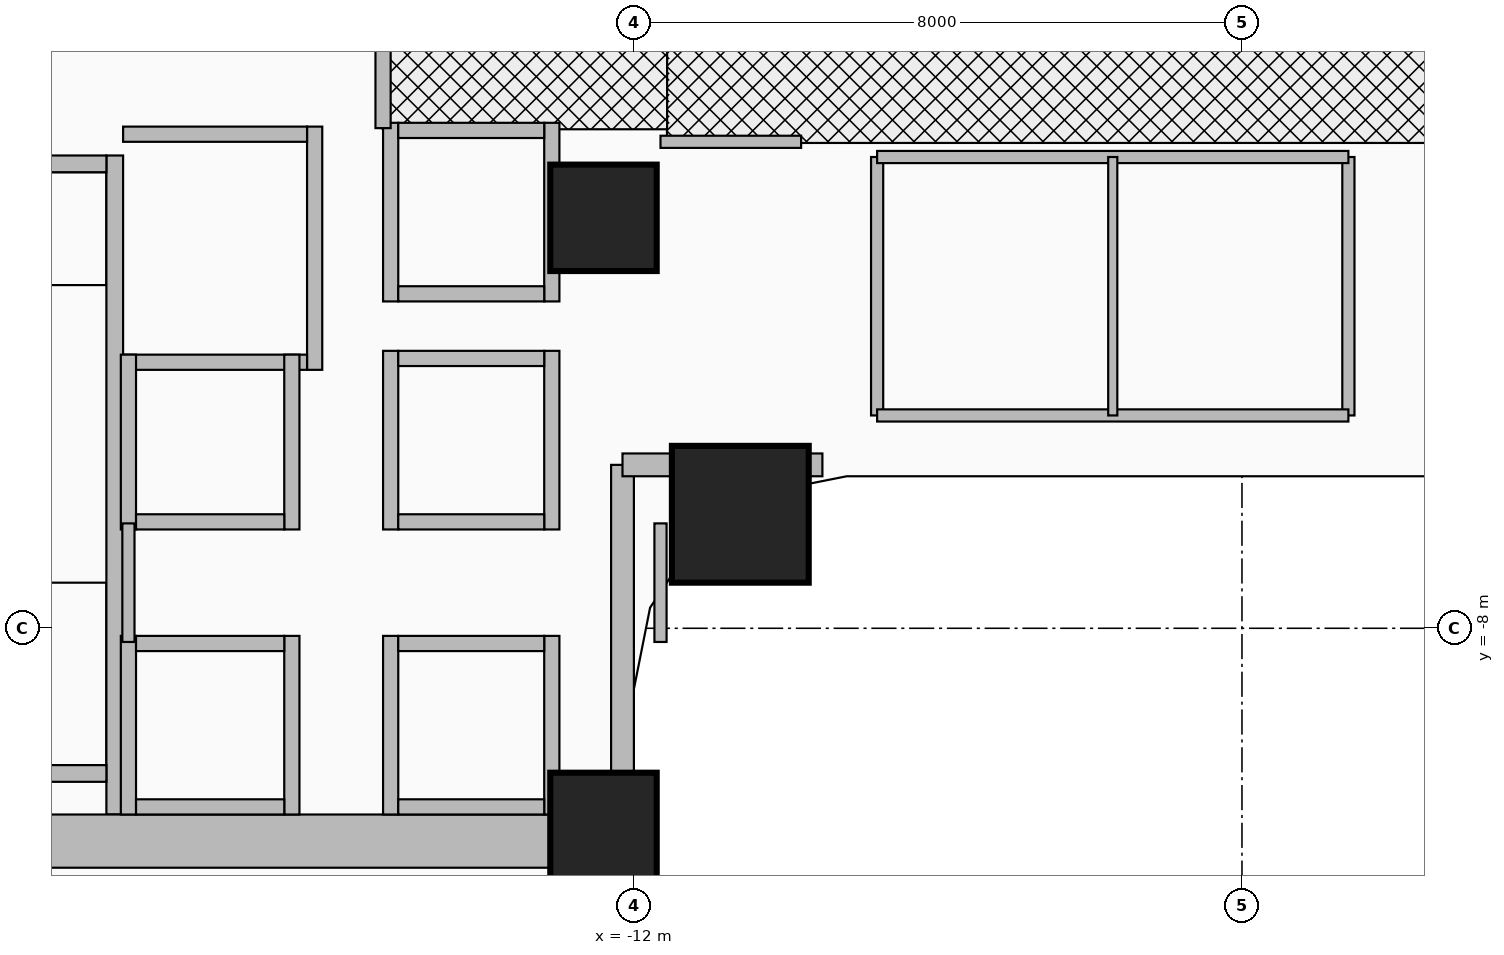
"""IFC4 building model, lengths in metres.
Left out: names, types, materials, properties, quantities, classifications, styles, units other than length and angle.
Written with IfcOpenShell. Run it as: python <this file> out.ifc"""

import sys

from ifc_helpers import new_model, si_unit, direction, frame, frame_2d, origin, origin_2d, place, context, subcontext, project, spatial, rectangle, extrude, source, transform, mapped, element, fill, save


model = new_model("IFC4")
c1 = context("Model", 3, precision=1e-05, world=origin(), true_north=direction((0.0, 1.0)))
c2 = subcontext(c1, "Body", "Model", "MODEL_VIEW")
j1 = project(units=[si_unit("LENGTHUNIT", "METRE"), si_unit("PLANEANGLEUNIT", "RADIAN")], contexts=[c1])
p1 = place(None, origin())
s1 = spatial("IfcSite", under=j1, at=p1, CompositionType="ELEMENT")
p2 = place(p1, origin())
s2 = spatial("IfcBuilding", under=s1, at=p2, CompositionType="ELEMENT")
p3 = place(p2, frame((0.0, 0.0, 15.6)))
s3 = spatial("IfcBuildingStorey", under=s2, at=p3, CompositionType="ELEMENT", Elevation=15.6)
p4 = place(p3, frame((-18.83, -10.45, 0.0), z_axis=(0.0, 0.0, 1.0), x_axis=(0.0, 1.0, 0.0)))
e1 = element("IfcWall", 1, at=p4, inside=s3, PredefinedType="SHEAR", context=c2, shape_type="SweptSolid", body=[
    extrude(rectangle(XDim=8.67, YDim=0.22, at=frame_2d((4.335, 0.0))), origin(), (0.0, 0.0, 1.0), 4.8),
])
p5 = place(p3, frame((-22.05, -9.91, 0.0), z_axis=(0.0, 0.0, 1.0), x_axis=(1.0, 0.0, 0.0)))
e2 = element("IfcWall", 2, at=p5, inside=s3, PredefinedType="SHEAR", context=c2, shape_type="SweptSolid", body=[
    extrude(rectangle(XDim=3.11, YDim=0.22, at=frame_2d((1.555, 0.0))), origin(), (0.0, 0.0, 1.0), 4.8),
])
p6 = place(p3, frame((-22.05, -1.89, 0.0), z_axis=(0.0, 0.0, 1.0), x_axis=(1.0, 0.0, 0.0)))
e3 = element("IfcWall", 3, at=p6, inside=s3, PredefinedType="SHEAR", context=c2, shape_type="SweptSolid", body=[
    extrude(rectangle(XDim=3.11, YDim=0.22, at=frame_2d((1.555, 0.0))), origin(), (0.0, 0.0, 1.0), 4.8),
])
p7 = place(p6, frame((1.0, 0.0, 0.0)))
e4 = element("IfcOpeningElement", 4, at=p7, cuts=e3, PredefinedType="OPENING", context=c2, shape_type="SweptSolid", body=[
    extrude(rectangle(XDim=1.1, YDim=2.15, at=frame_2d((0.55, 1.075))), frame((0.0, 0.125, 0.0), z_axis=(0.0, -1.0, 0.0), x_axis=(1.0, 0.0, 0.0)), (0.0, 0.0, 1.0), 0.25),
])
p8 = place(p3, frame((-22.65, -10.8, 0.0), z_axis=(0.0, 0.0, 1.0), x_axis=(1.0, 0.0, 0.0)))
e5 = element("IfcWall", 5, at=p8, inside=s3, PredefinedType="SHEAR", context=c2, shape_type="SweptSolid", body=[
    extrude(rectangle(XDim=10.25, YDim=0.7, at=frame_2d((5.125, 0.0))), origin(), (0.0, 0.0, 1.0), 4.8),
])
m1 = source(origin(), c2, "Body", "SweptSolid", [
    extrude(rectangle(XDim=1.4, YDim=1.4, at=origin_2d()), origin(), (0.0, 0.0, 1.0), 5.2),
])
for number, where, z_axis, x_axis in (
    (6, (-12.4, -10.6, 0.0), (0.0, 0.0, 1.0), (1.0, 0.0, 0.0)),
    (7, (-12.4, -2.6, 0.0), (0.0, 0.0, 1.0), (1.0, 0.0, 0.0)),
):
    element("IfcColumn", number, at=place(p3, frame(where, z_axis=z_axis, x_axis=x_axis)), inside=s3, PredefinedType="COLUMN", context=c2, shape_type="MappedRepresentation", body=[
        mapped(m1, transform((0.0, 0.0, 0.0), x_axis=(1.0, 0.0, 0.0), y_axis=(0.0, 1.0, 0.0), z_axis=(0.0, 0.0, 1.0), scale=1.0)),
    ])
m2 = source(origin(), c2, "Body", "SweptSolid", [
    extrude(rectangle(XDim=1.8, YDim=1.8, at=origin_2d()), origin(), (0.0, 0.0, 1.0), 5.2),
])
p9 = place(p3, frame((-10.6, -6.5, 0.0), z_axis=(0.0, 0.0, 1.0), x_axis=(1.0, 0.0, 0.0)))
e8 = element("IfcColumn", 8, at=p9, inside=s3, PredefinedType="COLUMN", context=c2, shape_type="MappedRepresentation", body=[
    mapped(m2, transform((0.0, 0.0, 0.0), x_axis=(1.0, 0.0, 0.0), y_axis=(0.0, 1.0, 0.0), z_axis=(0.0, 0.0, 1.0), scale=1.0)),
])
p10 = place(p3, frame((-12.15, -22.85, 0.0), z_axis=(0.0, 0.0, 1.0), x_axis=(0.0, 1.0, 0.0)))
e9 = element("IfcWall", 9, at=p10, inside=s3, PredefinedType="SOLIDWALL", context=c2, shape_type="SweptSolid", body=[
    extrude(rectangle(XDim=17.0, YDim=0.3, at=frame_2d((8.5, 0.0))), origin(), (0.0, 0.0, 1.0), 3.585),
])
p11 = place(p3, frame((-12.15, -5.85, 0.0), z_axis=(0.0, 0.0, 1.0), x_axis=(1.0, 0.0, 0.0)))
e10 = element("IfcWall", 10, at=p11, inside=s3, PredefinedType="SOLIDWALL", context=c2, shape_type="SweptSolid", body=[
    extrude(rectangle(XDim=2.63, YDim=0.3, at=frame_2d((1.315, 0.0))), origin(), (0.0, 0.0, 1.0), 4.8),
])
p12 = place(p3, frame((-16.2, -4.6, 0.0), z_axis=(0.0, 0.0, 1.0), x_axis=(0.0, 1.0, 0.0)))
e11 = element("IfcWall", 11, at=p12, inside=s3, PredefinedType="MOVABLE", context=c2, shape_type="SweptSolid", body=[
    extrude(rectangle(XDim=3.2, YDim=0.2, at=frame_2d((1.6, 0.0))), origin(), (0.0, 0.0, 1.0), 4.8),
])
p13 = place(p3, frame((-18.72, -4.5, 0.0), z_axis=(0.0, 0.0, 1.0), x_axis=(1.0, 0.0, 0.0)))
e12 = element("IfcWall", 12, at=p13, inside=s3, PredefinedType="MOVABLE", context=c2, shape_type="SweptSolid", body=[
    extrude(rectangle(XDim=2.42, YDim=0.2, at=frame_2d((1.21, 0.0))), origin(), (0.0, 0.0, 1.0), 4.8),
])
p14 = place(p3, frame((-18.72, -1.5, 0.0), z_axis=(0.0, 0.0, 1.0), x_axis=(1.0, 0.0, 0.0)))
e13 = element("IfcWall", 13, at=p14, inside=s3, PredefinedType="MOVABLE", context=c2, shape_type="SweptSolid", body=[
    extrude(rectangle(XDim=2.42, YDim=0.2, at=frame_2d((1.21, 0.0))), origin(), (0.0, 0.0, 1.0), 4.8),
])
p15 = place(p14, frame((0.61, 0.0, 0.0)))
e14 = element("IfcOpeningElement", 14, at=p15, cuts=e13, PredefinedType="OPENING", context=c2, shape_type="SweptSolid", body=[
    extrude(rectangle(XDim=1.2, YDim=2.1, at=frame_2d((0.6, 1.05))), frame((0.0, 0.115, 0.0), z_axis=(0.0, -1.0, 0.0), x_axis=(1.0, 0.0, 0.0)), (0.0, 0.0, 1.0), 0.23),
])
for number, where, z_axis, x_axis in (
    (15, (-15.2, -10.45, 0.0), (0.0, 0.0, 1.0), (0.0, 1.0, 0.0)),
    (16, (-13.08, -10.45, 0.0), (0.0, 0.0, 1.0), (0.0, 1.0, 0.0)),
):
    element("IfcWall", number, at=place(p3, frame(where, z_axis=z_axis, x_axis=x_axis)), inside=s3, PredefinedType="MOVABLE", context=c2, shape_type="SweptSolid", body=[
        extrude(rectangle(XDim=2.35, YDim=0.2, at=frame_2d((1.175, 0.0))), origin(), (0.0, 0.0, 1.0), 3.585),
    ])
p16 = place(p3, frame((-15.1, -10.35, 0.0), z_axis=(0.0, 0.0, 1.0), x_axis=(1.0, 0.0, 0.0)))
e17 = element("IfcWall", 17, at=p16, inside=s3, PredefinedType="MOVABLE", context=c2, shape_type="SweptSolid", body=[
    extrude(rectangle(XDim=1.92, YDim=0.2, at=frame_2d((0.96, 0.0))), origin(), (0.0, 0.0, 1.0), 3.585),
])
p17 = place(p3, frame((-15.1, -8.2, 0.0), z_axis=(0.0, 0.0, 1.0), x_axis=(1.0, 0.0, 0.0)))
e18 = element("IfcWall", 18, at=p17, inside=s3, PredefinedType="MOVABLE", context=c2, shape_type="SweptSolid", body=[
    extrude(rectangle(XDim=1.92, YDim=0.2, at=frame_2d((0.96, 0.0))), origin(), (0.0, 0.0, 1.0), 4.8),
])
p18 = place(p17, frame((0.41, 0.0, 0.0)))
e19 = element("IfcOpeningElement", 19, at=p18, cuts=e18, PredefinedType="OPENING", context=c2, shape_type="SweptSolid", body=[
    extrude(rectangle(XDim=1.1, YDim=2.1, at=frame_2d((0.55, 1.05))), frame((0.0, 0.115, 0.0), z_axis=(0.0, -1.0, 0.0), x_axis=(1.0, 0.0, 0.0)), (0.0, 0.0, 1.0), 0.23),
])
for number, where, z_axis, x_axis in (
    (20, (-15.2, -6.7, 0.0), (0.0, 0.0, 1.0), (0.0, 1.0, 0.0)),
    (21, (-13.08, -6.7, 0.0), (0.0, 0.0, 1.0), (0.0, 1.0, 0.0)),
):
    element("IfcWall", number, at=place(p3, frame(where, z_axis=z_axis, x_axis=x_axis)), inside=s3, PredefinedType="MOVABLE", context=c2, shape_type="SweptSolid", body=[
        extrude(rectangle(XDim=2.35, YDim=0.2, at=frame_2d((1.175, 0.0))), origin(), (0.0, 0.0, 1.0), 4.8),
    ])
p19 = place(p3, frame((-15.1, -6.6, 0.0), z_axis=(0.0, 0.0, 1.0), x_axis=(1.0, 0.0, 0.0)))
e22 = element("IfcWall", 22, at=p19, inside=s3, PredefinedType="MOVABLE", context=c2, shape_type="SweptSolid", body=[
    extrude(rectangle(XDim=1.92, YDim=0.2, at=frame_2d((0.96, 0.0))), origin(), (0.0, 0.0, 1.0), 4.8),
])
p20 = place(p19, frame((0.41, 0.0, 0.0)))
e23 = element("IfcOpeningElement", 23, at=p20, cuts=e22, PredefinedType="OPENING", context=c2, shape_type="SweptSolid", body=[
    extrude(rectangle(XDim=1.1, YDim=2.1, at=frame_2d((0.55, 1.05))), frame((0.0, 0.115, 0.0), z_axis=(0.0, -1.0, 0.0), x_axis=(1.0, 0.0, 0.0)), (0.0, 0.0, 1.0), 0.23),
])
p21 = place(p3, frame((-15.1, -4.45, 0.0), z_axis=(0.0, 0.0, 1.0), x_axis=(1.0, 0.0, 0.0)))
e24 = element("IfcWall", 24, at=p21, inside=s3, PredefinedType="MOVABLE", context=c2, shape_type="SweptSolid", body=[
    extrude(rectangle(XDim=1.92, YDim=0.2, at=frame_2d((0.96, 0.0))), origin(), (0.0, 0.0, 1.0), 4.8),
])
for number, where, z_axis, x_axis in (
    (25, (-18.65, -10.45, 0.0), (0.0, 0.0, 1.0), (0.0, 1.0, 0.0)),
    (26, (-16.5, -10.45, 0.0), (0.0, 0.0, 1.0), (0.0, 1.0, 0.0)),
):
    element("IfcWall", number, at=place(p3, frame(where, z_axis=z_axis, x_axis=x_axis)), inside=s3, PredefinedType="MOVABLE", context=c2, shape_type="SweptSolid", body=[
        extrude(rectangle(XDim=2.35, YDim=0.2, at=frame_2d((1.175, 0.0))), origin(), (0.0, 0.0, 1.0), 3.585),
    ])
p22 = place(p3, frame((-18.55, -10.35, 0.0), z_axis=(0.0, 0.0, 1.0), x_axis=(1.0, 0.0, 0.0)))
e27 = element("IfcWall", 27, at=p22, inside=s3, PredefinedType="MOVABLE", context=c2, shape_type="SweptSolid", body=[
    extrude(rectangle(XDim=1.95, YDim=0.2, at=frame_2d((0.975, 0.0))), origin(), (0.0, 0.0, 1.0), 3.585),
])
p23 = place(p3, frame((-18.55, -8.2, 0.0), z_axis=(0.0, 0.0, 1.0), x_axis=(1.0, 0.0, 0.0)))
e28 = element("IfcWall", 28, at=p23, inside=s3, PredefinedType="MOVABLE", context=c2, shape_type="SweptSolid", body=[
    extrude(rectangle(XDim=1.95, YDim=0.2, at=frame_2d((0.975, 0.0))), origin(), (0.0, 0.0, 1.0), 4.8),
])
for number, where, z_axis, x_axis in (
    (29, (-18.65, -6.7, 0.0), (0.0, 0.0, 1.0), (0.0, 1.0, 0.0)),
    (30, (-16.5, -6.7, 0.0), (0.0, 0.0, 1.0), (0.0, 1.0, 0.0)),
):
    element("IfcWall", number, at=place(p3, frame(where, z_axis=z_axis, x_axis=x_axis)), inside=s3, PredefinedType="MOVABLE", context=c2, shape_type="SweptSolid", body=[
        extrude(rectangle(XDim=2.3, YDim=0.2, at=frame_2d((1.15, 0.0))), origin(), (0.0, 0.0, 1.0), 4.8),
    ])
p24 = place(p3, frame((-18.55, -6.6, 0.0), z_axis=(0.0, 0.0, 1.0), x_axis=(1.0, 0.0, 0.0)))
e31 = element("IfcWall", 31, at=p24, inside=s3, PredefinedType="MOVABLE", context=c2, shape_type="SweptSolid", body=[
    extrude(rectangle(XDim=1.95, YDim=0.2, at=frame_2d((0.975, 0.0))), origin(), (0.0, 0.0, 1.0), 4.8),
])
for number, where, z_axis, x_axis in (
    (32, (-15.2, -3.7, 0.0), (0.0, 0.0, 1.0), (0.0, 1.0, 0.0)),
    (33, (-13.08, -3.7, 0.0), (0.0, 0.0, 1.0), (0.0, 1.0, 0.0)),
):
    element("IfcWall", number, at=place(p3, frame(where, z_axis=z_axis, x_axis=x_axis)), inside=s3, PredefinedType="MOVABLE", context=c2, shape_type="SweptSolid", body=[
        extrude(rectangle(XDim=2.35, YDim=0.2, at=frame_2d((1.175, 0.0))), origin(), (0.0, 0.0, 1.0), 4.8),
    ])
for number, where, z_axis, x_axis in (
    (34, (-15.1, -3.6, 0.0), (0.0, 0.0, 1.0), (1.0, 0.0, 0.0)),
    (35, (-15.1, -1.45, 0.0), (0.0, 0.0, 1.0), (1.0, 0.0, 0.0)),
):
    element("IfcWall", number, at=place(p3, frame(where, z_axis=z_axis, x_axis=x_axis)), inside=s3, PredefinedType="MOVABLE", context=c2, shape_type="SweptSolid", body=[
        extrude(rectangle(XDim=1.92, YDim=0.2, at=frame_2d((0.96, 0.0))), origin(), (0.0, 0.0, 1.0), 4.8),
    ])
p25 = place(p3, frame((-15.3, -1.42, 0.0), z_axis=(0.0, 0.0, 1.0), x_axis=(0.0, 1.0, 0.0)))
e36 = element("IfcWall", 36, at=p25, inside=s3, PredefinedType="PARTITIONING", context=c2, shape_type="SweptSolid", body=[
    extrude(rectangle(XDim=2.67, YDim=0.2, at=frame_2d((1.335, 0.0))), origin(), (0.0, 0.0, 1.0), 4.8),
])
p26 = place(p25, frame((0.78, 0.0, 0.0)))
e37 = element("IfcOpeningElement", 37, at=p26, cuts=e36, PredefinedType="OPENING", context=c2, shape_type="SweptSolid", body=[
    extrude(rectangle(XDim=1.05, YDim=2.15, at=frame_2d((0.525, 1.075))), frame((0.0, 0.115, 0.0), z_axis=(0.0, -1.0, 0.0), x_axis=(1.0, 0.0, 0.0)), (0.0, 0.0, 1.0), 0.23),
])
p27 = place(p3, frame((-18.65, -8.18, 0.0), z_axis=(0.0, 0.0, 1.0), x_axis=(0.0, 1.0, 0.0)))
e38 = element("IfcWall", 38, at=p27, inside=s3, PredefinedType="PARTITIONING", context=c2, shape_type="SweptSolid", body=[
    extrude(rectangle(XDim=1.56, YDim=0.16, at=frame_2d((0.78, 0.0))), origin(), (0.0, 0.0, 1.0), 4.8),
])
p28 = place(p3, frame((-11.65, -8.18, 0.0), z_axis=(0.0, 0.0, 1.0), x_axis=(0.0, 1.0, 0.0)))
e39 = element("IfcWall", 39, at=p28, inside=s3, PredefinedType="PARTITIONING", context=c2, shape_type="SweptSolid", body=[
    extrude(rectangle(XDim=1.56, YDim=0.16, at=frame_2d((0.78, 0.0))), origin(), (0.0, 0.0, 1.0), 3.837),
])
for number, where, z_axis, x_axis in (
    (40, (-8.8, -5.2, 0.0), (0.0, 0.0, 1.0), (0.0, 1.0, 0.0)),
    (41, (-2.6, -5.2, 0.0), (0.0, 0.0, 1.0), (0.0, 1.0, 0.0)),
):
    element("IfcWall", number, at=place(p3, frame(where, z_axis=z_axis, x_axis=x_axis)), inside=s3, PredefinedType="PARTITIONING", context=c2, shape_type="SweptSolid", body=[
        extrude(rectangle(XDim=3.4, YDim=0.16, at=frame_2d((1.7, 0.0))), origin(), (0.0, 0.0, 1.0), 4.8),
    ])
p29 = place(p3, frame((-8.8, -5.2, 0.0), z_axis=(0.0, 0.0, 1.0), x_axis=(1.0, 0.0, 0.0)))
e42 = element("IfcWall", 42, at=p29, inside=s3, PredefinedType="PARTITIONING", context=c2, shape_type="SweptSolid", body=[
    extrude(rectangle(XDim=6.2, YDim=0.16, at=frame_2d((3.1, 0.0))), origin(), (0.0, 0.0, 1.0), 4.8),
])
p30 = place(p3, frame((-8.8, -1.8, 0.0), z_axis=(0.0, 0.0, 1.0), x_axis=(1.0, 0.0, 0.0)))
e43 = element("IfcWall", 43, at=p30, inside=s3, PredefinedType="PARTITIONING", context=c2, shape_type="SweptSolid", body=[
    extrude(rectangle(XDim=6.2, YDim=0.16, at=frame_2d((3.1, 0.0))), origin(), (0.0, 0.0, 1.0), 4.8),
])
p31 = place(p30, frame((0.3, 0.0, 0.0)))
e44 = element("IfcOpeningElement", 44, at=p31, cuts=e43, PredefinedType="OPENING", context=c2, shape_type="SweptSolid", body=[
    extrude(rectangle(XDim=0.85, YDim=2.1, at=frame_2d((0.425, 1.05))), frame((0.0, 0.095, 0.0), z_axis=(0.0, -1.0, 0.0), x_axis=(1.0, 0.0, 0.0)), (0.0, 0.0, 1.0), 0.19),
])
p32 = place(p30, frame((3.35, 0.0, 0.0)))
e45 = element("IfcOpeningElement", 45, at=p32, cuts=e43, PredefinedType="OPENING", context=c2, shape_type="SweptSolid", body=[
    extrude(rectangle(XDim=0.85, YDim=2.1, at=frame_2d((0.425, 1.05))), frame((0.0, 0.095, 0.0), z_axis=(0.0, -1.0, 0.0), x_axis=(1.0, 0.0, 0.0)), (0.0, 0.0, 1.0), 0.19),
])
p33 = place(p3, frame((-5.7, -5.2, 0.0), z_axis=(0.0, 0.0, 1.0), x_axis=(0.0, 1.0, 0.0)))
e46 = element("IfcWall", 46, at=p33, inside=s3, PredefinedType="PARTITIONING", context=c2, shape_type="SweptSolid", body=[
    extrude(rectangle(XDim=3.4, YDim=0.12, at=frame_2d((1.7, 0.0))), origin(), (0.0, 0.0, 1.0), 4.8),
])
p34 = place(p3, frame((-11.65, -1.6, 0.0), z_axis=(0.0, 0.0, 1.0), x_axis=(1.0, 0.0, 0.0)))
e47 = element("IfcWall", 47, at=p34, inside=s3, PredefinedType="PARTITIONING", context=c2, shape_type="SweptSolid", body=[
    extrude(rectangle(XDim=1.85, YDim=0.16, at=frame_2d((0.925, 0.0))), origin(), (0.0, 0.0, 1.0), 4.8),
])
p35 = place(p15, origin())
e48 = element("IfcDoor", 48, at=p35, inside=s3, OperationType="DOUBLE_DOOR_SLIDING", PredefinedType="DOOR", context=c2, shape_type="SweptSolid", body=[
    extrude(rectangle(XDim=1.2, YDim=2.1, at=frame_2d((0.6, 1.05))), frame((0.0, 0.025, 0.0), z_axis=(0.0, -1.0, 0.0), x_axis=(1.0, 0.0, 0.0)), (0.0, 0.0, 1.0), 0.05),
])
fill(e14, e48)
p36 = place(p18, origin())
e49 = element("IfcDoor", 49, at=p36, inside=s3, OperationType="DOUBLE_DOOR_SLIDING", PredefinedType="DOOR", context=c2, shape_type="SweptSolid", body=[
    extrude(rectangle(XDim=1.1, YDim=2.1, at=frame_2d((0.55, 1.05))), frame((0.0, 0.025, 0.0), z_axis=(0.0, -1.0, 0.0), x_axis=(1.0, 0.0, 0.0)), (0.0, 0.0, 1.0), 0.05),
])
fill(e19, e49)
p37 = place(p20, origin())
e50 = element("IfcDoor", 50, at=p37, inside=s3, OperationType="DOUBLE_DOOR_SLIDING", PredefinedType="DOOR", context=c2, shape_type="SweptSolid", body=[
    extrude(rectangle(XDim=1.1, YDim=2.1, at=frame_2d((0.55, 1.05))), frame((0.0, 0.025, 0.0), z_axis=(0.0, -1.0, 0.0), x_axis=(1.0, 0.0, 0.0)), (0.0, 0.0, 1.0), 0.05),
])
fill(e23, e50)
p38 = place(p26, origin())
e51 = element("IfcDoor", 51, at=p38, inside=s3, OperationType="SINGLE_SWING_RIGHT", PredefinedType="DOOR", context=c2, shape_type="SweptSolid", body=[
    extrude(rectangle(XDim=1.05, YDim=2.15, at=frame_2d((0.525, 1.075))), frame((0.0, 0.025, 0.0), z_axis=(0.0, -1.0, 0.0), x_axis=(1.0, 0.0, 0.0)), (0.0, 0.0, 1.0), 0.05),
])
fill(e37, e51)
p39 = place(p31, origin())
e52 = element("IfcDoor", 52, at=p39, inside=s3, OperationType="SINGLE_SWING_LEFT", PredefinedType="DOOR", context=c2, shape_type="SweptSolid", body=[
    extrude(rectangle(XDim=0.85, YDim=2.1, at=frame_2d((0.425, 1.05))), frame((0.0, 0.025, 0.0), z_axis=(0.0, -1.0, 0.0), x_axis=(1.0, 0.0, 0.0)), (0.0, 0.0, 1.0), 0.05),
])
fill(e44, e52)
p40 = place(p32, origin())
e53 = element("IfcDoor", 53, at=p40, inside=s3, OperationType="SINGLE_SWING_RIGHT", PredefinedType="DOOR", context=c2, shape_type="SweptSolid", body=[
    extrude(rectangle(XDim=0.85, YDim=2.1, at=frame_2d((0.425, 1.05))), frame((0.0, 0.025, 0.0), z_axis=(0.0, -1.0, 0.0), x_axis=(1.0, 0.0, 0.0)), (0.0, 0.0, 1.0), 0.05),
])
fill(e45, e53)
save(model, sys.argv[1])
